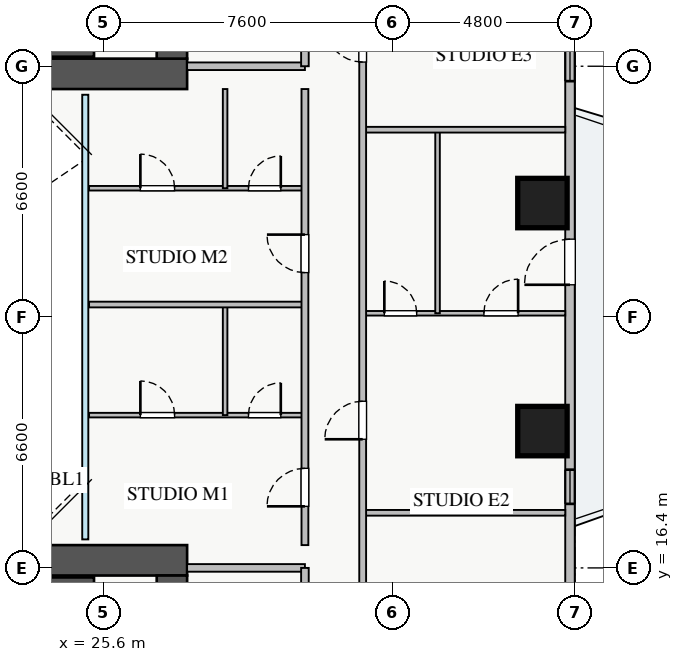
"""IFC4 building model, lengths in metres.
Left out: names, types, materials, properties, quantities, classifications, styles, units other than length and angle.
Written with IfcOpenShell. Run it as: python <this file> out.ifc"""

import sys

from ifc_helpers import new_model, si_unit, direction, frame, frame_2d, origin, origin_2d, place, context, subcontext, project, spatial, rectangle, extrude, source, transform, mapped, element, fill, save


model = new_model("IFC4")
c1 = context("Model", 3, precision=1e-05, world=origin(), true_north=direction((0.0, 1.0)))
c2 = subcontext(c1, "Body", "Model", "MODEL_VIEW")
j1 = project(units=[si_unit("LENGTHUNIT", "METRE"), si_unit("PLANEANGLEUNIT", "RADIAN")], contexts=[c1])
p1 = place(None, origin())
s1 = spatial("IfcSite", under=j1, at=p1, CompositionType="ELEMENT")
p2 = place(p1, origin())
s2 = spatial("IfcBuilding", under=s1, at=p2, CompositionType="ELEMENT")
p3 = place(p2, frame((0.0, 0.0, 82.75)))
s3 = spatial("IfcBuildingStorey", under=s2, at=p3, CompositionType="ELEMENT", Elevation=82.75)
for number, where, z_axis, x_axis in (
    (1, (18.2, 29.95, 0.0), (0.0, 0.0, 1.0), (1.0, 0.0, 0.0)),
    (2, (18.2, 16.05, 0.0), (0.0, 0.0, 1.0), (1.0, 0.0, 0.0)),
):
    element("IfcWall", number, at=place(p3, frame(where, z_axis=z_axis, x_axis=x_axis)), inside=s3, PredefinedType="SHEAR", context=c2, shape_type="SweptSolid", body=[
        extrude(rectangle(XDim=7.15, YDim=0.2, at=frame_2d((3.575, 0.0))), origin(), (0.0, 0.0, 1.0), 3.25),
    ])
p4 = place(p3, frame((10.2, 29.4, 0.0), z_axis=(0.0, 0.0, 1.0), x_axis=(1.0, 0.0, 0.0)))
e3 = element("IfcWall", 3, at=p4, inside=s3, PredefinedType="SHEAR", context=c2, shape_type="SweptSolid", body=[
    extrude(rectangle(XDim=17.6, YDim=0.8, at=frame_2d((8.8, 0.0))), origin(), (0.0, 0.0, 1.0), 3.25),
])
p5 = place(p3, frame((27.4, 29.8, 0.0), z_axis=(0.0, 0.0, 1.0), x_axis=(0.0, 1.0, 0.0)))
e4 = element("IfcWall", 4, at=p5, inside=s3, PredefinedType="SHEAR", context=c2, shape_type="SweptSolid", body=[
    extrude(rectangle(XDim=5.6, YDim=0.8, at=frame_2d((2.8, 0.0))), origin(), (0.0, 0.0, 1.0), 3.25),
])
p6 = place(p5, frame((1.1, 0.0, 0.0)))
e5 = element("IfcOpeningElement", 5, at=p6, cuts=e4, PredefinedType="OPENING", context=c2, shape_type="SweptSolid", body=[
    extrude(rectangle(XDim=1.3, YDim=2.05, at=frame_2d((0.65, 1.025))), frame((0.0, 0.41, 0.0), z_axis=(0.0, -1.0, 0.0), x_axis=(1.0, 0.0, 0.0)), (0.0, 0.0, 1.0), 0.82),
])
p7 = place(p3, frame((10.2, 16.6, 0.0), z_axis=(0.0, 0.0, 1.0), x_axis=(1.0, 0.0, 0.0)))
e6 = element("IfcWall", 6, at=p7, inside=s3, PredefinedType="SHEAR", context=c2, shape_type="SweptSolid", body=[
    extrude(rectangle(XDim=17.6, YDim=0.8, at=frame_2d((8.8, 0.0))), origin(), (0.0, 0.0, 1.0), 3.25),
])
p8 = place(p3, frame((27.4, 10.6, 0.0), z_axis=(0.0, 0.0, 1.0), x_axis=(0.0, 1.0, 0.0)))
e7 = element("IfcWall", 7, at=p8, inside=s3, PredefinedType="SHEAR", context=c2, shape_type="SweptSolid", body=[
    extrude(rectangle(XDim=5.6, YDim=0.8, at=frame_2d((2.8, 0.0))), origin(), (0.0, 0.0, 1.0), 3.25),
])
p9 = place(p8, frame((2.1, 0.0, 0.0)))
e8 = element("IfcOpeningElement", 8, at=p9, cuts=e7, PredefinedType="OPENING", context=c2, shape_type="SweptSolid", body=[
    extrude(rectangle(XDim=1.3, YDim=2.05, at=frame_2d((0.65, 1.025))), frame((0.0, 0.41, 0.0), z_axis=(0.0, -1.0, 0.0), x_axis=(1.0, 0.0, 0.0)), (0.0, 0.0, 1.0), 0.82),
])
m1 = source(origin(), c2, "Body", "SweptSolid", [
    extrude(rectangle(XDim=1.3, YDim=1.3, at=origin_2d()), origin(), (0.0, 0.0, 1.0), 3.25),
])
for number, where, z_axis, x_axis in (
    (9, (37.15, 20.0, 0.0), (0.0, 0.0, 1.0), (1.0, 0.0, 0.0)),
    (10, (37.15, 26.0, 0.0), (0.0, 0.0, 1.0), (1.0, 0.0, 0.0)),
):
    element("IfcColumn", number, at=place(p3, frame(where, z_axis=z_axis, x_axis=x_axis)), inside=s3, PredefinedType="COLUMN", context=c2, shape_type="MappedRepresentation", body=[
        mapped(m1, transform((0.0, 0.0, 0.0), x_axis=(1.0, 0.0, 0.0), y_axis=(0.0, 1.0, 0.0), z_axis=(0.0, 0.0, 1.0), scale=1.0)),
    ])
p10 = place(p3, frame((37.875, 9.45, 0.0), z_axis=(0.0, 0.0, 1.0), x_axis=(0.0, 1.0, 0.0)))
e11 = element("IfcWall", 11, at=p10, inside=s3, PredefinedType="STANDARD", context=c2, shape_type="SweptSolid", body=[
    extrude(rectangle(XDim=27.1, YDim=0.25, at=frame_2d((13.55, 0.0))), origin(), (0.0, 0.0, 1.0), 2.61),
])
p11 = place(p10, frame((14.4, 0.0, 0.0)))
e12 = element("IfcOpeningElement", 12, at=p11, cuts=e11, PredefinedType="OPENING", context=c2, shape_type="SweptSolid", body=[
    extrude(rectangle(XDim=1.2, YDim=2.1, at=frame_2d((0.6, 1.05))), frame((0.0, 0.135, 0.0), z_axis=(0.0, -1.0, 0.0), x_axis=(1.0, 0.0, 0.0)), (0.0, 0.0, 1.0), 0.27),
])
p12 = place(p10, frame((2.188, 0.0, 0.9)))
e13 = element("IfcOpeningElement", 13, at=p12, cuts=e11, PredefinedType="OPENING", context=c2, shape_type="SweptSolid", body=[
    extrude(rectangle(XDim=2.4, YDim=1.48, at=frame_2d((1.2, 0.74))), frame((0.0, 0.135, 0.0), z_axis=(0.0, -1.0, 0.0), x_axis=(1.0, 0.0, 0.0)), (0.0, 0.0, 1.0), 0.27),
])
p13 = place(p10, frame((23.788, 0.0, 0.9)))
e14 = element("IfcOpeningElement", 14, at=p13, cuts=e11, PredefinedType="OPENING", context=c2, shape_type="SweptSolid", body=[
    extrude(rectangle(XDim=1.8, YDim=1.5, at=frame_2d((0.9, 0.75))), frame((0.0, 0.135, 0.0), z_axis=(0.0, -1.0, 0.0), x_axis=(1.0, 0.0, 0.0)), (0.0, 0.0, 1.0), 0.27),
])
p14 = place(p10, frame((19.758, 0.0, 0.9)))
e15 = element("IfcOpeningElement", 15, at=p14, cuts=e11, PredefinedType="OPENING", context=c2, shape_type="SweptSolid", body=[
    extrude(rectangle(XDim=2.4, YDim=1.5, at=frame_2d((1.2, 0.75))), frame((0.0, 0.135, 0.0), z_axis=(0.0, -1.0, 0.0), x_axis=(1.0, 0.0, 0.0)), (0.0, 0.0, 1.0), 0.27),
])
p15 = place(p10, frame((8.635, 0.0, 0.9)))
e16 = element("IfcOpeningElement", 16, at=p15, cuts=e11, PredefinedType="OPENING", context=c2, shape_type="SweptSolid", body=[
    extrude(rectangle(XDim=0.9, YDim=1.2, at=frame_2d((0.45, 0.6))), frame((0.0, 0.135, 0.0), z_axis=(0.0, -1.0, 0.0), x_axis=(1.0, 0.0, 0.0)), (0.0, 0.0, 1.0), 0.27),
])
p16 = place(p3, frame((27.8, 29.6, 0.0), z_axis=(0.0, 0.0, 1.0), x_axis=(1.0, 0.0, 0.0)))
e17 = element("IfcWall", 17, at=p16, inside=s3, PredefinedType="PARTITIONING", context=c2, shape_type="SweptSolid", body=[
    extrude(rectangle(XDim=3.1, YDim=0.2, at=frame_2d((1.55, 0.0))), origin(), (0.0, 0.0, 1.0), 3.07),
])
p17 = place(p3, frame((30.9, 29.6, 0.0), z_axis=(0.0, 0.0, 1.0), x_axis=(0.0, 1.0, 0.0)))
e18 = element("IfcWall", 18, at=p17, inside=s3, PredefinedType="PARTITIONING", context=c2, shape_type="SweptSolid", body=[
    extrude(rectangle(XDim=3.9, YDim=0.2, at=frame_2d((1.95, 0.0))), origin(), (0.0, 0.0, 1.0), 3.07),
])
p18 = place(p17, frame((1.4, 0.0, 0.0)))
e19 = element("IfcOpeningElement", 19, at=p18, cuts=e18, PredefinedType="OPENING", context=c2, shape_type="SweptSolid", body=[
    extrude(rectangle(XDim=1.1, YDim=2.05, at=frame_2d((0.55, 1.025))), frame((0.0, 0.11, 0.0), z_axis=(0.0, -1.0, 0.0), x_axis=(1.0, 0.0, 0.0)), (0.0, 0.0, 1.0), 0.22),
])
p19 = place(p3, frame((27.8, 16.4, 0.0), z_axis=(0.0, 0.0, 1.0), x_axis=(1.0, 0.0, 0.0)))
e20 = element("IfcWall", 20, at=p19, inside=s3, PredefinedType="PARTITIONING", context=c2, shape_type="SweptSolid", body=[
    extrude(rectangle(XDim=3.1, YDim=0.2, at=frame_2d((1.55, 0.0))), origin(), (0.0, 0.0, 1.0), 3.07),
])
p20 = place(p3, frame((30.9, 12.5, 0.0), z_axis=(0.0, 0.0, 1.0), x_axis=(0.0, 1.0, 0.0)))
e21 = element("IfcWall", 21, at=p20, inside=s3, PredefinedType="PARTITIONING", context=c2, shape_type="SweptSolid", body=[
    extrude(rectangle(XDim=3.9, YDim=0.2, at=frame_2d((1.95, 0.0))), origin(), (0.0, 0.0, 1.0), 3.07),
])
p21 = place(p20, frame((1.4, 0.0, 0.0)))
e22 = element("IfcOpeningElement", 22, at=p21, cuts=e21, PredefinedType="OPENING", context=c2, shape_type="SweptSolid", body=[
    extrude(rectangle(XDim=1.1, YDim=2.05, at=frame_2d((0.55, 1.025))), frame((0.0, 0.11, 0.0), z_axis=(0.0, -1.0, 0.0), x_axis=(1.0, 0.0, 0.0)), (0.0, 0.0, 1.0), 0.22),
])
p22 = place(p3, frame((32.42, 23.1, 0.0), z_axis=(0.0, 0.0, 1.0), x_axis=(1.0, 0.0, 0.0)))
e23 = element("IfcWall", 23, at=p22, inside=s3, PredefinedType="PLUMBINGWALL", context=c2, shape_type="SweptSolid", body=[
    extrude(rectangle(XDim=5.33, YDim=0.12, at=frame_2d((2.665, 0.0))), origin(), (0.0, 0.0, 1.0), 3.07),
])
p23 = place(p22, frame((0.57, 0.0, 0.0)))
e24 = element("IfcOpeningElement", 24, at=p23, cuts=e23, PredefinedType="OPENING", context=c2, shape_type="SweptSolid", body=[
    extrude(rectangle(XDim=0.85, YDim=2.05, at=frame_2d((0.425, 1.025))), frame((0.0, 0.07, 0.0), z_axis=(0.0, -1.0, 0.0), x_axis=(1.0, 0.0, 0.0)), (0.0, 0.0, 1.0), 0.14),
])
p24 = place(p22, frame((3.19, 0.0, 0.0)))
e25 = element("IfcOpeningElement", 25, at=p24, cuts=e23, PredefinedType="OPENING", context=c2, shape_type="SweptSolid", body=[
    extrude(rectangle(XDim=0.9, YDim=2.05, at=frame_2d((0.45, 1.025))), frame((0.0, 0.07, 0.0), z_axis=(0.0, -1.0, 0.0), x_axis=(1.0, 0.0, 0.0)), (0.0, 0.0, 1.0), 0.14),
])
p25 = place(p3, frame((34.39, 23.1, 0.0), z_axis=(0.0, 0.0, 1.0), x_axis=(0.0, 1.0, 0.0)))
e26 = element("IfcWall", 26, at=p25, inside=s3, PredefinedType="PLUMBINGWALL", context=c2, shape_type="SweptSolid", body=[
    extrude(rectangle(XDim=4.83, YDim=0.12, at=frame_2d((2.415, 0.0))), origin(), (0.0, 0.0, 1.0), 3.07),
])
p26 = place(p3, frame((32.42, 17.85, 0.0), z_axis=(0.0, 0.0, 1.0), x_axis=(1.0, 0.0, 0.0)))
e27 = element("IfcWall", 27, at=p26, inside=s3, PredefinedType="PARTITIONING", context=c2, shape_type="SweptSolid", body=[
    extrude(rectangle(XDim=5.33, YDim=0.15, at=frame_2d((2.665, 0.0))), origin(), (0.0, 0.0, 1.0), 3.07),
])
p27 = place(p3, frame((32.42, 27.93, 0.0), z_axis=(0.0, 0.0, 1.0), x_axis=(1.0, 0.0, 0.0)))
e28 = element("IfcWall", 28, at=p27, inside=s3, PredefinedType="PARTITIONING", context=c2, shape_type="SweptSolid", body=[
    extrude(rectangle(XDim=5.33, YDim=0.15, at=frame_2d((2.665, 0.0))), origin(), (0.0, 0.0, 1.0), 2.771),
])
p28 = place(p3, frame((32.42, 7.21, 0.0), z_axis=(0.0, 0.0, 1.0), x_axis=(0.0, 1.0, 0.0)))
e29 = element("IfcWall", 29, at=p28, inside=s3, PredefinedType="PARTITIONING", context=c2, shape_type="SweptSolid", body=[
    extrude(rectangle(XDim=31.23, YDim=0.18, at=frame_2d((15.615, 0.0))), origin(), (0.0, 0.0, 1.0), 2.865),
])
p29 = place(p28, frame((30.09, 0.0, 0.0)))
e30 = element("IfcOpeningElement", 30, at=p29, cuts=e29, PredefinedType="OPENING", context=c2, shape_type="SweptSolid", body=[
    extrude(rectangle(XDim=0.9, YDim=2.05, at=frame_2d((0.45, 1.025))), frame((0.0, 0.1, 0.0), z_axis=(0.0, -1.0, 0.0), x_axis=(1.0, 0.0, 0.0)), (0.0, 0.0, 1.0), 0.2),
])
p30 = place(p28, frame((0.415, 0.0, 0.0)))
e31 = element("IfcOpeningElement", 31, at=p30, cuts=e29, PredefinedType="OPENING", context=c2, shape_type="SweptSolid", body=[
    extrude(rectangle(XDim=0.9, YDim=2.05, at=frame_2d((0.45, 1.025))), frame((0.0, 0.1, 0.0), z_axis=(0.0, -1.0, 0.0), x_axis=(1.0, 0.0, 0.0)), (0.0, 0.0, 1.0), 0.2),
])
p31 = place(p28, frame((5.675, 0.0, 0.0)))
e32 = element("IfcOpeningElement", 32, at=p31, cuts=e29, PredefinedType="OPENING", context=c2, shape_type="SweptSolid", body=[
    extrude(rectangle(XDim=1.0, YDim=2.05, at=frame_2d((0.5, 1.025))), frame((0.0, 0.1, 0.0), z_axis=(0.0, -1.0, 0.0), x_axis=(1.0, 0.0, 0.0)), (0.0, 0.0, 1.0), 0.2),
])
p32 = place(p28, frame((12.575, 0.0, 0.0)))
e33 = element("IfcOpeningElement", 33, at=p32, cuts=e29, PredefinedType="OPENING", context=c2, shape_type="SweptSolid", body=[
    extrude(rectangle(XDim=1.0, YDim=2.05, at=frame_2d((0.5, 1.025))), frame((0.0, 0.1, 0.0), z_axis=(0.0, -1.0, 0.0), x_axis=(1.0, 0.0, 0.0)), (0.0, 0.0, 1.0), 0.2),
])
p33 = place(p28, frame((22.5, 0.0, 0.0)))
e34 = element("IfcOpeningElement", 34, at=p33, cuts=e29, PredefinedType="OPENING", context=c2, shape_type="SweptSolid", body=[
    extrude(rectangle(XDim=1.0, YDim=2.05, at=frame_2d((0.5, 1.025))), frame((0.0, 0.1, 0.0), z_axis=(0.0, -1.0, 0.0), x_axis=(1.0, 0.0, 0.0)), (0.0, 0.0, 1.0), 0.2),
])
p34 = place(p3, frame((25.22, 20.42, 0.0), z_axis=(0.0, 0.0, 1.0), x_axis=(1.0, 0.0, 0.0)))
e35 = element("IfcWall", 35, at=p34, inside=s3, PredefinedType="PLUMBINGWALL", context=c2, shape_type="SweptSolid", body=[
    extrude(rectangle(XDim=5.68, YDim=0.12, at=frame_2d((2.84, 0.0))), origin(), (0.0, 0.0, 1.0), 3.07),
])
p35 = place(p34, frame((1.35, 0.0, 0.0)))
e36 = element("IfcOpeningElement", 36, at=p35, cuts=e35, PredefinedType="OPENING", context=c2, shape_type="SweptSolid", body=[
    extrude(rectangle(XDim=0.9, YDim=2.05, at=frame_2d((0.45, 1.025))), frame((0.0, 0.07, 0.0), z_axis=(0.0, -1.0, 0.0), x_axis=(1.0, 0.0, 0.0)), (0.0, 0.0, 1.0), 0.14),
])
p36 = place(p34, frame((4.195, 0.0, 0.0)))
e37 = element("IfcOpeningElement", 37, at=p36, cuts=e35, PredefinedType="OPENING", context=c2, shape_type="SweptSolid", body=[
    extrude(rectangle(XDim=0.85, YDim=2.05, at=frame_2d((0.425, 1.025))), frame((0.0, 0.07, 0.0), z_axis=(0.0, -1.0, 0.0), x_axis=(1.0, 0.0, 0.0)), (0.0, 0.0, 1.0), 0.14),
])
p37 = place(p3, frame((28.8, 20.42, 0.0), z_axis=(0.0, 0.0, 1.0), x_axis=(0.0, 1.0, 0.0)))
e38 = element("IfcWall", 38, at=p37, inside=s3, PredefinedType="PLUMBINGWALL", context=c2, shape_type="SweptSolid", body=[
    extrude(rectangle(XDim=2.91, YDim=0.12, at=frame_2d((1.455, 0.0))), origin(), (0.0, 0.0, 1.0), 3.07),
])
p38 = place(p3, frame((25.22, 26.39, 0.0), z_axis=(0.0, 0.0, 1.0), x_axis=(1.0, 0.0, 0.0)))
e39 = element("IfcWall", 39, at=p38, inside=s3, PredefinedType="PLUMBINGWALL", context=c2, shape_type="SweptSolid", body=[
    extrude(rectangle(XDim=5.68, YDim=0.12, at=frame_2d((2.84, 0.0))), origin(), (0.0, 0.0, 1.0), 3.07),
])
p39 = place(p38, frame((1.35, 0.0, 0.0)))
e40 = element("IfcOpeningElement", 40, at=p39, cuts=e39, PredefinedType="OPENING", context=c2, shape_type="SweptSolid", body=[
    extrude(rectangle(XDim=0.9, YDim=2.05, at=frame_2d((0.45, 1.025))), frame((0.0, 0.07, 0.0), z_axis=(0.0, -1.0, 0.0), x_axis=(1.0, 0.0, 0.0)), (0.0, 0.0, 1.0), 0.14),
])
p40 = place(p38, frame((4.195, 0.0, 0.0)))
e41 = element("IfcOpeningElement", 41, at=p40, cuts=e39, PredefinedType="OPENING", context=c2, shape_type="SweptSolid", body=[
    extrude(rectangle(XDim=0.85, YDim=2.05, at=frame_2d((0.425, 1.025))), frame((0.0, 0.07, 0.0), z_axis=(0.0, -1.0, 0.0), x_axis=(1.0, 0.0, 0.0)), (0.0, 0.0, 1.0), 0.14),
])
p41 = place(p3, frame((28.8, 26.39, 0.0), z_axis=(0.0, 0.0, 1.0), x_axis=(0.0, 1.0, 0.0)))
e42 = element("IfcWall", 42, at=p41, inside=s3, PredefinedType="PLUMBINGWALL", context=c2, shape_type="SweptSolid", body=[
    extrude(rectangle(XDim=2.61, YDim=0.12, at=frame_2d((1.305, 0.0))), origin(), (0.0, 0.0, 1.0), 3.07),
])
p42 = place(p3, frame((25.22, 23.33, 0.0), z_axis=(0.0, 0.0, 1.0), x_axis=(1.0, 0.0, 0.0)))
e43 = element("IfcWall", 43, at=p42, inside=s3, PredefinedType="PARTITIONING", context=c2, shape_type="SweptSolid", body=[
    extrude(rectangle(XDim=5.68, YDim=0.15, at=frame_2d((2.84, 0.0))), origin(), (0.0, 0.0, 1.0), 3.07),
])
p43 = place(p3, frame((30.9, 17.0, 0.0), z_axis=(0.0, 0.0, 1.0), x_axis=(0.0, 1.0, 0.0)))
e44 = element("IfcWall", 44, at=p43, inside=s3, PredefinedType="PARTITIONING", context=c2, shape_type="SweptSolid", body=[
    extrude(rectangle(XDim=12.0, YDim=0.18, at=frame_2d((6.0, 0.0))), origin(), (0.0, 0.0, 1.0), 3.07),
])
p44 = place(p43, frame((1.02, 0.0, 0.0)))
e45 = element("IfcOpeningElement", 45, at=p44, cuts=e44, PredefinedType="OPENING", context=c2, shape_type="SweptSolid", body=[
    extrude(rectangle(XDim=1.0, YDim=2.05, at=frame_2d((0.5, 1.025))), frame((0.0, 0.1, 0.0), z_axis=(0.0, -1.0, 0.0), x_axis=(1.0, 0.0, 0.0)), (0.0, 0.0, 1.0), 0.2),
])
p45 = place(p43, frame((7.17, 0.0, 0.0)))
e46 = element("IfcOpeningElement", 46, at=p45, cuts=e44, PredefinedType="OPENING", context=c2, shape_type="SweptSolid", body=[
    extrude(rectangle(XDim=1.0, YDim=2.05, at=frame_2d((0.5, 1.025))), frame((0.0, 0.1, 0.0), z_axis=(0.0, -1.0, 0.0), x_axis=(1.0, 0.0, 0.0)), (0.0, 0.0, 1.0), 0.2),
])
m2 = source(origin(), c2, "Body", "SweptSolid", [
    extrude(rectangle(XDim=1.2, YDim=2.1, at=frame_2d((0.6, 1.05))), frame((0.0, 0.025, 0.0), z_axis=(0.0, -1.0, 0.0), x_axis=(1.0, 0.0, 0.0)), (0.0, 0.0, 1.0), 0.05),
])
p46 = place(p11, origin())
e47 = element("IfcDoor", 47, at=p46, inside=s3, OperationType="SINGLE_SWING_LEFT", PredefinedType="DOOR", context=c2, shape_type="MappedRepresentation", body=[
    mapped(m2, transform((0.0, 0.0, 0.0), x_axis=(1.0, 0.0, 0.0), y_axis=(0.0, 1.0, 0.0), z_axis=(0.0, 0.0, 1.0), scale=1.0)),
])
fill(e12, e47)
m3 = source(origin(), c2, "Body", "SweptSolid", [
    extrude(rectangle(XDim=0.85, YDim=2.05, at=frame_2d((0.425, 1.025))), frame((0.0, 0.025, 0.0), z_axis=(0.0, -1.0, 0.0), x_axis=(1.0, 0.0, 0.0)), (0.0, 0.0, 1.0), 0.05),
])
p47 = place(p23, origin())
e48 = element("IfcDoor", 48, at=p47, inside=s3, OperationType="SINGLE_SWING_LEFT", PredefinedType="DOOR", context=c2, shape_type="MappedRepresentation", body=[
    mapped(m3, transform((0.0, 0.0, 0.0), x_axis=(1.0, 0.0, 0.0), y_axis=(0.0, 1.0, 0.0), z_axis=(0.0, 0.0, 1.0), scale=1.0)),
])
fill(e24, e48)
m4 = source(origin(), c2, "Body", "SweptSolid", [
    extrude(rectangle(XDim=0.9, YDim=2.05, at=frame_2d((0.45, 1.025))), frame((0.0, 0.025, 0.0), z_axis=(0.0, -1.0, 0.0), x_axis=(1.0, 0.0, 0.0)), (0.0, 0.0, 1.0), 0.05),
])
p48 = place(p24, origin())
e49 = element("IfcDoor", 49, at=p48, inside=s3, OperationType="SINGLE_SWING_RIGHT", PredefinedType="DOOR", context=c2, shape_type="MappedRepresentation", body=[
    mapped(m4, transform((0.0, 0.0, 0.0), x_axis=(1.0, 0.0, 0.0), y_axis=(0.0, 1.0, 0.0), z_axis=(0.0, 0.0, 1.0), scale=1.0)),
])
fill(e25, e49)
m5 = source(origin(), c2, "Body", "SweptSolid", [
    extrude(rectangle(XDim=1.0, YDim=2.05, at=frame_2d((0.5, 1.025))), frame((0.0, 0.025, 0.0), z_axis=(0.0, -1.0, 0.0), x_axis=(1.0, 0.0, 0.0)), (0.0, 0.0, 1.0), 0.05),
])
p49 = place(p32, origin())
e50 = element("IfcDoor", 50, at=p49, inside=s3, OperationType="SINGLE_SWING_LEFT", PredefinedType="DOOR", context=c2, shape_type="MappedRepresentation", body=[
    mapped(m5, transform((0.0, 0.0, 0.0), x_axis=(1.0, 0.0, 0.0), y_axis=(0.0, 1.0, 0.0), z_axis=(0.0, 0.0, 1.0), scale=1.0)),
])
fill(e33, e50)
p50 = place(p33, origin())
e51 = element("IfcDoor", 51, at=p50, inside=s3, OperationType="SINGLE_SWING_RIGHT", PredefinedType="DOOR", context=c2, shape_type="MappedRepresentation", body=[
    mapped(m5, transform((0.0, 0.0, 0.0), x_axis=(1.0, 0.0, 0.0), y_axis=(0.0, 1.0, 0.0), z_axis=(0.0, 0.0, 1.0), scale=1.0)),
])
fill(e34, e51)
p51 = place(p35, origin())
e52 = element("IfcDoor", 52, at=p51, inside=s3, OperationType="SINGLE_SWING_LEFT", PredefinedType="DOOR", context=c2, shape_type="MappedRepresentation", body=[
    mapped(m4, transform((0.0, 0.0, 0.0), x_axis=(1.0, 0.0, 0.0), y_axis=(0.0, 1.0, 0.0), z_axis=(0.0, 0.0, 1.0), scale=1.0)),
])
fill(e36, e52)
p52 = place(p36, origin())
e53 = element("IfcDoor", 53, at=p52, inside=s3, OperationType="SINGLE_SWING_RIGHT", PredefinedType="DOOR", context=c2, shape_type="MappedRepresentation", body=[
    mapped(m3, transform((0.0, 0.0, 0.0), x_axis=(1.0, 0.0, 0.0), y_axis=(0.0, 1.0, 0.0), z_axis=(0.0, 0.0, 1.0), scale=1.0)),
])
fill(e37, e53)
p53 = place(p39, origin())
e54 = element("IfcDoor", 54, at=p53, inside=s3, OperationType="SINGLE_SWING_LEFT", PredefinedType="DOOR", context=c2, shape_type="MappedRepresentation", body=[
    mapped(m4, transform((0.0, 0.0, 0.0), x_axis=(1.0, 0.0, 0.0), y_axis=(0.0, 1.0, 0.0), z_axis=(0.0, 0.0, 1.0), scale=1.0)),
])
fill(e40, e54)
p54 = place(p40, origin())
e55 = element("IfcDoor", 55, at=p54, inside=s3, OperationType="SINGLE_SWING_RIGHT", PredefinedType="DOOR", context=c2, shape_type="MappedRepresentation", body=[
    mapped(m3, transform((0.0, 0.0, 0.0), x_axis=(1.0, 0.0, 0.0), y_axis=(0.0, 1.0, 0.0), z_axis=(0.0, 0.0, 1.0), scale=1.0)),
])
fill(e41, e55)
p55 = place(p44, origin())
e56 = element("IfcDoor", 56, at=p55, inside=s3, OperationType="SINGLE_SWING_LEFT", PredefinedType="DOOR", context=c2, shape_type="MappedRepresentation", body=[
    mapped(m5, transform((0.0, 0.0, 0.0), x_axis=(1.0, 0.0, 0.0), y_axis=(0.0, 1.0, 0.0), z_axis=(0.0, 0.0, 1.0), scale=1.0)),
])
fill(e45, e56)
p56 = place(p45, origin())
e57 = element("IfcDoor", 57, at=p56, inside=s3, OperationType="SINGLE_SWING_RIGHT", PredefinedType="DOOR", context=c2, shape_type="MappedRepresentation", body=[
    mapped(m5, transform((0.0, 0.0, 0.0), x_axis=(1.0, 0.0, 0.0), y_axis=(0.0, 1.0, 0.0), z_axis=(0.0, 0.0, 1.0), scale=1.0)),
])
fill(e46, e57)
m6 = source(origin(), c2, "Body", "SweptSolid", [
    extrude(rectangle(XDim=2.4, YDim=1.5, at=frame_2d((1.2, 0.75))), frame((0.0, 0.03, 0.0), z_axis=(0.0, -1.0, 0.0), x_axis=(1.0, 0.0, 0.0)), (0.0, 0.0, 1.0), 0.06),
])
p57 = place(p14, origin())
e58 = element("IfcWindow", 58, at=p57, inside=s3, PartitioningType="TRIPLE_PANEL_VERTICAL", PredefinedType="WINDOW", context=c2, shape_type="MappedRepresentation", body=[
    mapped(m6, transform((0.0, 0.0, 0.0), x_axis=(1.0, 0.0, 0.0), y_axis=(0.0, 1.0, 0.0), z_axis=(0.0, 0.0, 1.0), scale=1.0)),
])
fill(e15, e58)
m7 = source(origin(), c2, "Body", "SweptSolid", [
    extrude(rectangle(XDim=0.9, YDim=1.2, at=frame_2d((0.45, 0.6))), frame((0.0, 0.03, 0.0), z_axis=(0.0, -1.0, 0.0), x_axis=(1.0, 0.0, 0.0)), (0.0, 0.0, 1.0), 0.06),
])
p58 = place(p15, origin())
e59 = element("IfcWindow", 59, at=p58, inside=s3, PartitioningType="SINGLE_PANEL", PredefinedType="WINDOW", context=c2, shape_type="MappedRepresentation", body=[
    mapped(m7, transform((0.0, 0.0, 0.0), x_axis=(1.0, 0.0, 0.0), y_axis=(0.0, 1.0, 0.0), z_axis=(0.0, 0.0, 1.0), scale=1.0)),
])
fill(e16, e59)
save(model, sys.argv[1])
